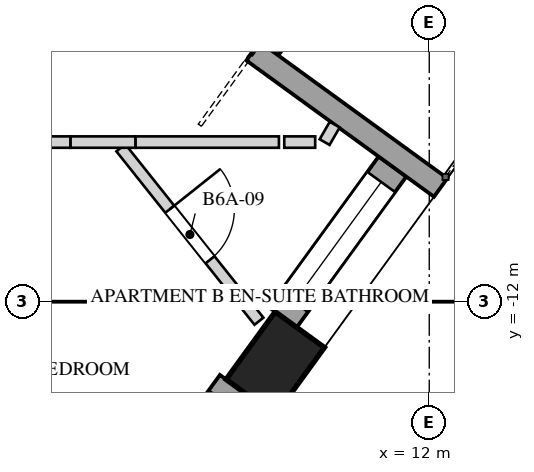
"""IFC4 building model, lengths in metres.
Left out: names, types, materials, properties, quantities, classifications, styles, units other than length and angle.
Written with IfcOpenShell. Run it as: python <this file> out.ifc"""

import sys

from ifc_helpers import new_model, si_unit, direction, frame, frame_2d, origin, origin_2d, place, context, subcontext, project, spatial, rectangle, extrude, element, fill, save


model = new_model("IFC4")
c1 = context("Model", 3, precision=1e-05, world=origin(), true_north=direction((0.0, 1.0)))
c2 = subcontext(c1, "Body", "Model", "MODEL_VIEW")
j1 = project(units=[si_unit("LENGTHUNIT", "METRE"), si_unit("PLANEANGLEUNIT", "RADIAN")], contexts=[c1])
p1 = place(None, origin())
s1 = spatial("IfcSite", under=j1, at=p1, CompositionType="ELEMENT")
p2 = place(p1, origin())
s2 = spatial("IfcBuilding", under=s1, at=p2, CompositionType="ELEMENT")
p3 = place(p2, frame((0.0, 0.0, 241.2)))
s3 = spatial("IfcBuildingStorey", under=s2, at=p3, CompositionType="ELEMENT", Elevation=241.2)
p4 = place(p3, frame((9.974, -12.813, 0.0), z_axis=(0.0, 0.0, 1.0), x_axis=(0.587785252292, 0.809016994375, 0.0)))
e1 = element("IfcColumn", 1, at=p4, inside=s3, PredefinedType="COLUMN", context=c2, shape_type="SweptSolid", body=[
    extrude(rectangle(XDim=1.1, YDim=0.8, at=origin_2d()), origin(), (0.0, 0.0, 1.0), 4.0),
])
p5 = place(p3, frame((7.987, -15.08, 0.0), z_axis=(0.0, 0.0, 1.0), x_axis=(0.587792773076, 0.809011530152, 0.0)))
e2 = element("IfcWall", 2, at=p5, inside=s3, PredefinedType="SOLIDWALL", context=c2, shape_type="SweptSolid", body=[
    extrude(rectangle(XDim=2.452, YDim=0.45, at=frame_2d((1.226, 0.0))), origin(), (0.0, 0.0, 1.0), 3.3),
])
p6 = place(p5, frame((0.251, 0.0, 0.4)))
e3 = element("IfcOpeningElement", 3, at=p6, cuts=e2, PredefinedType="OPENING", context=c2, shape_type="SweptSolid", body=[
    extrude(rectangle(XDim=1.95, YDim=2.75, at=frame_2d((0.975, 1.375))), frame((0.0, 0.235, 0.0), z_axis=(0.0, -1.0, 0.0), x_axis=(1.0, 0.0, 0.0)), (0.0, 0.0, 1.0), 0.47),
])
p7 = place(p3, frame((10.074, -12.206, 0.0), z_axis=(0.0, 0.0, 1.0), x_axis=(0.587792773076, 0.809011530152, 0.0)))
e4 = element("IfcWall", 4, at=p7, inside=s3, PredefinedType="SOLIDWALL", context=c2, shape_type="SweptSolid", body=[
    extrude(rectangle(XDim=2.452, YDim=0.45, at=frame_2d((1.226, 0.0))), origin(), (0.0, 0.0, 1.0), 3.3),
])
p8 = place(p7, frame((0.251, 0.0, 0.4)))
e5 = element("IfcOpeningElement", 5, at=p8, cuts=e4, PredefinedType="OPENING", context=c2, shape_type="SweptSolid", body=[
    extrude(rectangle(XDim=1.95, YDim=2.75, at=frame_2d((0.975, 1.375))), frame((0.0, 0.235, 0.0), z_axis=(0.0, -1.0, 0.0), x_axis=(1.0, 0.0, 0.0)), (0.0, 0.0, 1.0), 0.47),
])
p9 = place(p3, frame((9.892, -8.672, 0.0), z_axis=(0.0, 0.0, 1.0), x_axis=(0.587833242688, 0.808982125137, 0.0)))
e6 = element("IfcWall", 6, at=p9, inside=s3, PredefinedType="SOLIDWALL", context=c2, shape_type="SweptSolid", body=[
    extrude(rectangle(XDim=2.402, YDim=0.3, at=frame_2d((1.201, 0.0))), origin(), (0.0, 0.0, 1.0), 3.3),
])
p10 = place(p9, frame((0.351, 0.0, 0.0)))
e7 = element("IfcOpeningElement", 7, at=p10, cuts=e6, PredefinedType="OPENING", context=c2, shape_type="SweptSolid", body=[
    extrude(rectangle(XDim=1.7, YDim=2.5, at=frame_2d((0.85, 1.25))), frame((0.0, 0.16, 0.0), z_axis=(0.0, -1.0, 0.0), x_axis=(1.0, 0.0, 0.0)), (0.0, 0.0, 1.0), 0.32),
])
p11 = place(p3, frame((12.15, -10.498, 0.0), z_axis=(0.0, 0.0, 1.0), x_axis=(-0.80902328748, 0.587776590479, 0.0)))
e8 = element("IfcWall", 8, at=p11, inside=s3, PredefinedType="SOLIDWALL", context=c2, shape_type="SweptSolid", body=[
    extrude(rectangle(XDim=3.05, YDim=0.3, at=frame_2d((1.525, 0.0))), origin(), (0.0, 0.0, 1.0), 3.3),
])
p12 = place(p3, frame((7.943, -9.975, 0.0), z_axis=(0.0, 0.0, 1.0), x_axis=(0.622917295976, -0.782287697956, 0.0)))
e9 = element("IfcWall", 9, at=p12, inside=s3, PredefinedType="PARTITIONING", context=c2, shape_type="SweptSolid", body=[
    extrude(rectangle(XDim=2.917, YDim=0.15, at=frame_2d((1.458, 0.0))), origin(), (0.0, 0.0, 1.0), 2.95),
])
p13 = place(p12, frame((1.033, 0.0, 0.0)))
e10 = element("IfcOpeningElement", 10, at=p13, cuts=e9, PredefinedType="OPENING", context=c2, shape_type="SweptSolid", body=[
    extrude(rectangle(XDim=0.85, YDim=2.4, at=frame_2d((0.425, 1.2))), frame((0.0, 0.085, 0.0), z_axis=(0.0, -1.0, 0.0), x_axis=(1.0, 0.0, 0.0)), (0.0, 0.0, 1.0), 0.17),
])
p14 = place(p3, frame((10.022, -9.9, 0.0), z_axis=(0.0, 0.0, 1.0), x_axis=(-1.0, 0.0, 0.0)))
e11 = element("IfcWall", 11, at=p14, inside=s3, PredefinedType="PARTITIONING", context=c2, shape_type="SweptSolid", body=[
    extrude(rectangle(XDim=1.888, YDim=0.15, at=frame_2d((0.944, 0.0))), origin(), (0.0, 0.0, 1.0), 3.65),
])
p15 = place(p3, frame((8.134, -9.9, 0.0), z_axis=(0.0, 0.0, 1.0), x_axis=(-1.0, 0.0, 0.0)))
e12 = element("IfcWall", 12, at=p15, inside=s3, PredefinedType="PARTITIONING", context=c2, shape_type="SweptSolid", body=[
    extrude(rectangle(XDim=0.855, YDim=0.15, at=frame_2d((0.428, 0.0))), origin(), (0.0, 0.0, 1.0), 2.95),
])
p16 = place(p3, frame((7.279, -9.9, 0.0), z_axis=(0.0, 0.0, 1.0), x_axis=(-1.0, 0.0, 0.0)))
e13 = element("IfcWall", 13, at=p16, inside=s3, PredefinedType="PARTITIONING", context=c2, shape_type="SweptSolid", body=[
    extrude(rectangle(XDim=4.576, YDim=0.15, at=frame_2d((2.288, 0.0))), origin(), (0.0, 0.0, 1.0), 3.65),
])
p17 = place(p16, frame((0.745, 0.0, 0.0)))
e14 = element("IfcOpeningElement", 14, at=p17, cuts=e13, PredefinedType="OPENING", context=c2, shape_type="SweptSolid", body=[
    extrude(rectangle(XDim=0.95, YDim=2.4, at=frame_2d((0.475, 1.2))), frame((0.0, 0.085, 0.0), z_axis=(0.0, -1.0, 0.0), x_axis=(1.0, 0.0, 0.0)), (0.0, 0.0, 1.0), 0.17),
])
p18 = place(p3, frame((10.092, -9.9, 0.0), z_axis=(0.0, 0.0, 1.0), x_axis=(1.0, 0.0, 0.0)))
e15 = element("IfcWall", 15, at=p18, inside=s3, PredefinedType="PARTITIONING", context=c2, shape_type="SweptSolid", body=[
    extrude(rectangle(XDim=0.407, YDim=0.15, at=frame_2d((0.204, 0.0))), origin(), (0.0, 0.0, 1.0), 3.65),
])
p19 = place(p3, frame((10.756, -9.67, 0.0), z_axis=(0.0, 0.0, 1.0), x_axis=(-0.499802134818, -0.866139611167, 0.0)))
e16 = element("IfcWall", 16, at=p19, inside=s3, PredefinedType="PARTITIONING", context=c2, shape_type="SweptSolid", body=[
    extrude(rectangle(XDim=0.265, YDim=0.15, at=frame_2d((0.133, 0.0))), origin(), (0.0, 0.0, 1.0), 3.65),
])
p20 = place(p8, origin())
e17 = element("IfcWindow", 17, at=p20, inside=s3, PartitioningType="SINGLE_PANEL", PredefinedType="WINDOW", context=c2, shape_type="SweptSolid", body=[
    extrude(rectangle(XDim=1.95, YDim=2.75, at=frame_2d((0.975, 1.375))), frame((0.0, 0.03, 0.0), z_axis=(0.0, -1.0, 0.0), x_axis=(1.0, 0.0, 0.0)), (0.0, 0.0, 1.0), 0.06),
])
fill(e5, e17)
p21 = place(p13, origin())
e18 = element("IfcDoor", 18, at=p21, inside=s3, OperationType="SINGLE_SWING_LEFT", PredefinedType="DOOR", context=c2, shape_type="SweptSolid", body=[
    extrude(rectangle(XDim=0.85, YDim=2.4, at=frame_2d((0.425, 1.2))), frame((0.0, 0.025, 0.0), z_axis=(0.0, -1.0, 0.0), x_axis=(1.0, 0.0, 0.0)), (0.0, 0.0, 1.0), 0.05),
])
fill(e10, e18)
save(model, sys.argv[1])
